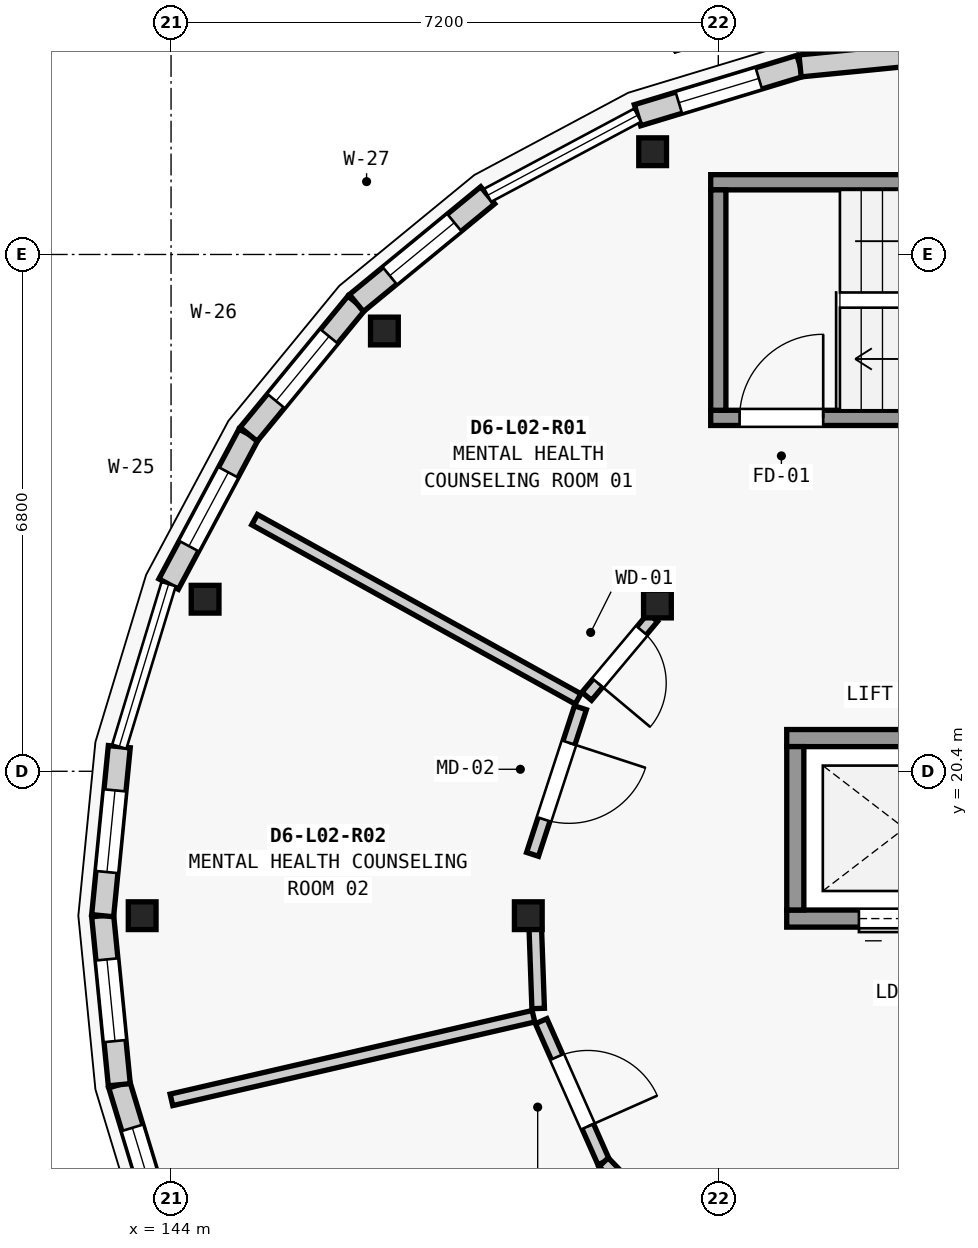
"""IFC4 building model, lengths in metres.
Left out: names, types, materials, properties, quantities, classifications, styles, units other than length and angle.
Written with IfcOpenShell. Run it as: python <this file> out.ifc"""

import sys

from ifc_helpers import new_model, si_unit, direction, frame, frame_2d, origin, origin_2d, place, context, subcontext, project, spatial, rectangle, extrude, element, fill, save


model = new_model("IFC4")
c1 = context("Model", 3, precision=1e-05, world=origin(), true_north=direction((0.0, 1.0)))
c2 = subcontext(c1, "Body", "Model", "MODEL_VIEW")
j1 = project(units=[si_unit("LENGTHUNIT", "METRE"), si_unit("PLANEANGLEUNIT", "RADIAN")], contexts=[c1])
p1 = place(None, origin())
s1 = spatial("IfcSite", under=j1, at=p1, CompositionType="ELEMENT")
p2 = place(p1, origin())
s2 = spatial("IfcBuilding", under=s1, at=p2, CompositionType="ELEMENT")
p3 = place(p2, frame((0.0, 0.0, 8.75)))
s3 = spatial("IfcBuildingStorey", under=s2, at=p3, CompositionType="ELEMENT", Elevation=8.75)
for number, where, z_axis, x_axis in (
    (1, (150.336, 28.552, 0.0), (0.0, 0.0, 1.0), (1.0, 0.0, 0.0)),
    (2, (146.807, 26.193, 0.0), (0.0, 0.0, 1.0), (1.0, 0.0, 0.0)),
    (3, (144.448, 22.664, 0.0), (0.0, 0.0, 1.0), (1.0, 0.0, 0.0)),
    (4, (143.62, 18.5, 0.0), (0.0, 0.0, 1.0), (1.0, 0.0, 0.0)),
    (5, (150.399, 22.601, 0.0), (0.0, 0.0, 1.0), (1.0, 0.0, 0.0)),
    (6, (148.7, 18.5, 0.0), (0.0, 0.0, 1.0), (1.0, 0.0, 0.0)),
):
    element("IfcColumn", number, at=place(p3, frame(where, z_axis=z_axis, x_axis=x_axis)), inside=s3, PredefinedType="COLUMN", context=c2, shape_type="SweptSolid", body=[
        extrude(rectangle(XDim=0.365, YDim=0.365, at=origin_2d()), origin(), (0.0, 0.0, 1.0), 4.2),
    ])
p4 = place(p3, frame((143.968, 14.137, 0.0), z_axis=(0.0, 0.0, 1.0), x_axis=(-0.290322655883, 0.956928814218, 0.0)))
e7 = element("IfcWall", 7, at=p4, inside=s3, PredefinedType="ELEMENTEDWALL", context=c2, shape_type="SweptSolid", body=[
    extrude(rectangle(XDim=2.235, YDim=0.29, at=frame_2d((1.118, 0.0))), origin(), (0.0, 0.0, 1.0), 3.314),
])
p5 = place(p4, frame((0.593, 0.0, 0.85)))
e8 = element("IfcOpeningElement", 8, at=p5, cuts=e7, PredefinedType="OPENING", context=c2, shape_type="SweptSolid", body=[
    extrude(rectangle(XDim=1.05, YDim=2.15, at=frame_2d((0.525, 1.075))), frame((0.0, 0.155, 0.0), z_axis=(0.0, -1.0, 0.0), x_axis=(1.0, 0.0, 0.0)), (0.0, 0.0, 1.0), 0.31),
])
p6 = place(p3, frame((143.319, 16.276, 0.0), z_axis=(0.0, 0.0, 1.0), x_axis=(-0.097989369151, 0.995187461503, 0.0)))
e9 = element("IfcWall", 9, at=p6, inside=s3, PredefinedType="ELEMENTEDWALL", context=c2, shape_type="SweptSolid", body=[
    extrude(rectangle(XDim=2.235, YDim=0.29, at=frame_2d((1.117, 0.0))), origin(), (0.0, 0.0, 1.0), 3.314),
])
p7 = place(p6, frame((0.577, 0.0, 0.85)))
e10 = element("IfcOpeningElement", 10, at=p7, cuts=e9, PredefinedType="OPENING", context=c2, shape_type="SweptSolid", body=[
    extrude(rectangle(XDim=1.08, YDim=1.5, at=frame_2d((0.54, 0.75))), frame((0.0, 0.155, 0.0), z_axis=(0.0, -1.0, 0.0), x_axis=(1.0, 0.0, 0.0)), (0.0, 0.0, 1.0), 0.31),
])
p8 = place(p3, frame((143.1, 18.5, 0.0), z_axis=(0.0, 0.0, 1.0), x_axis=(0.097989369151, 0.995187461503, 0.0)))
e11 = element("IfcWall", 11, at=p8, inside=s3, PredefinedType="ELEMENTEDWALL", context=c2, shape_type="SweptSolid", body=[
    extrude(rectangle(XDim=2.235, YDim=0.29, at=frame_2d((1.117, 0.0))), origin(), (0.0, 0.0, 1.0), 3.314),
])
p9 = place(p8, frame((0.577, 0.0, 0.85)))
e12 = element("IfcOpeningElement", 12, at=p9, cuts=e11, PredefinedType="OPENING", context=c2, shape_type="SweptSolid", body=[
    extrude(rectangle(XDim=1.08, YDim=1.8, at=frame_2d((0.54, 0.9))), frame((0.0, 0.155, 0.0), z_axis=(0.0, -1.0, 0.0), x_axis=(1.0, 0.0, 0.0)), (0.0, 0.0, 1.0), 0.31),
])
p10 = place(p3, frame((143.968, 22.863, 0.0), z_axis=(0.0, 0.0, 1.0), x_axis=(0.471217561446, 0.882017012185, 0.0)))
e13 = element("IfcWall", 13, at=p10, inside=s3, PredefinedType="ELEMENTEDWALL", context=c2, shape_type="SweptSolid", body=[
    extrude(rectangle(XDim=2.235, YDim=0.29, at=frame_2d((1.117, 0.0))), origin(), (0.0, 0.0, 1.0), 3.314),
])
p11 = place(p10, frame((0.567, 0.0, 0.85)))
e14 = element("IfcOpeningElement", 14, at=p11, cuts=e13, PredefinedType="OPENING", context=c2, shape_type="SweptSolid", body=[
    extrude(rectangle(XDim=1.1, YDim=1.25, at=frame_2d((0.55, 0.625))), frame((0.0, 0.155, 0.0), z_axis=(0.0, -1.0, 0.0), x_axis=(1.0, 0.0, 0.0)), (0.0, 0.0, 1.0), 0.31),
])
p12 = place(p3, frame((145.021, 24.834, 0.0), z_axis=(0.0, 0.0, 1.0), x_axis=(0.63455767339, 0.772875513354, 0.0)))
e15 = element("IfcWall", 15, at=p12, inside=s3, PredefinedType="ELEMENTEDWALL", context=c2, shape_type="SweptSolid", body=[
    extrude(rectangle(XDim=2.235, YDim=0.29, at=frame_2d((1.117, 0.0))), origin(), (0.0, 0.0, 1.0), 3.314),
])
p13 = place(p12, frame((0.567, 0.0, 0.85)))
e16 = element("IfcOpeningElement", 16, at=p13, cuts=e15, PredefinedType="OPENING", context=c2, shape_type="SweptSolid", body=[
    extrude(rectangle(XDim=1.1, YDim=1.5, at=frame_2d((0.55, 0.75))), frame((0.0, 0.155, 0.0), z_axis=(0.0, -1.0, 0.0), x_axis=(1.0, 0.0, 0.0)), (0.0, 0.0, 1.0), 0.31),
])
p14 = place(p3, frame((146.439, 26.561, 0.0), z_axis=(0.0, 0.0, 1.0), x_axis=(0.772875513354, 0.63455767339, 0.0)))
e17 = element("IfcWall", 17, at=p14, inside=s3, PredefinedType="ELEMENTEDWALL", context=c2, shape_type="SweptSolid", body=[
    extrude(rectangle(XDim=2.235, YDim=0.29, at=frame_2d((1.117, 0.0))), origin(), (0.0, 0.0, 1.0), 3.314),
])
p15 = place(p14, frame((0.567, 0.0, 0.85)))
e18 = element("IfcOpeningElement", 18, at=p15, cuts=e17, PredefinedType="OPENING", context=c2, shape_type="SweptSolid", body=[
    extrude(rectangle(XDim=1.1, YDim=1.85, at=frame_2d((0.55, 0.925))), frame((0.0, 0.155, 0.0), z_axis=(0.0, -1.0, 0.0), x_axis=(1.0, 0.0, 0.0)), (0.0, 0.0, 1.0), 0.31),
])
p16 = place(p3, frame((150.137, 29.032, 0.0), z_axis=(0.0, 0.0, 1.0), x_axis=(0.956928814218, 0.290322655883, 0.0)))
e19 = element("IfcWall", 19, at=p16, inside=s3, PredefinedType="ELEMENTEDWALL", context=c2, shape_type="SweptSolid", body=[
    extrude(rectangle(XDim=2.235, YDim=0.29, at=frame_2d((1.118, 0.0))), origin(), (0.0, 0.0, 1.0), 3.314),
])
p17 = place(p16, frame((0.568, 0.0, 0.85)))
e20 = element("IfcOpeningElement", 20, at=p17, cuts=e19, PredefinedType="OPENING", context=c2, shape_type="SweptSolid", body=[
    extrude(rectangle(XDim=1.1, YDim=2.1, at=frame_2d((0.55, 1.05))), frame((0.0, 0.155, 0.0), z_axis=(0.0, -1.0, 0.0), x_axis=(1.0, 0.0, 0.0)), (0.0, 0.0, 1.0), 0.31),
])
p18 = place(p3, frame((152.276, 29.681, 0.0), z_axis=(0.0, 0.0, 1.0), x_axis=(0.995187461503, 0.097989369151, 0.0)))
e21 = element("IfcWall", 21, at=p18, inside=s3, PredefinedType="ELEMENTEDWALL", context=c2, shape_type="SweptSolid", body=[
    extrude(rectangle(XDim=2.235, YDim=0.29, at=frame_2d((1.117, 0.0))), origin(), (0.0, 0.0, 1.0), 3.314),
])
p19 = place(p3, frame((151.1, 25.05, 0.0), z_axis=(0.0, 0.0, 1.0), x_axis=(1.0, 0.0, 0.0)))
e22 = element("IfcWall", 22, at=p19, inside=s3, PredefinedType="SHEAR", context=c2, shape_type="SweptSolid", body=[
    extrude(rectangle(XDim=6.8, YDim=0.2, at=frame_2d((3.4, 0.0))), origin(), (0.0, 0.0, 1.0), 3.96),
])
p20 = place(p19, frame((0.38, 0.0, 0.0)))
e23 = element("IfcOpeningElement", 23, at=p20, cuts=e22, PredefinedType="OPENING", context=c2, shape_type="SweptSolid", body=[
    extrude(rectangle(XDim=1.1, YDim=2.15, at=frame_2d((0.55, 1.075))), frame((0.0, 0.11, 0.0), z_axis=(0.0, -1.0, 0.0), x_axis=(1.0, 0.0, 0.0)), (0.0, 0.0, 1.0), 0.22),
])
p21 = place(p3, frame((151.1, 28.15, 0.0), z_axis=(0.0, 0.0, 1.0), x_axis=(1.0, 0.0, 0.0)))
e24 = element("IfcWall", 24, at=p21, inside=s3, PredefinedType="SHEAR", context=c2, shape_type="SweptSolid", body=[
    extrude(rectangle(XDim=6.8, YDim=0.2, at=frame_2d((3.4, 0.0))), origin(), (0.0, 0.0, 1.0), 3.96),
])
p22 = place(p3, frame((151.2, 25.15, 0.0), z_axis=(0.0, 0.0, 1.0), x_axis=(0.0, 1.0, 0.0)))
e25 = element("IfcWall", 25, at=p22, inside=s3, PredefinedType="SHEAR", context=c2, shape_type="SweptSolid", body=[
    extrude(rectangle(XDim=2.9, YDim=0.2, at=frame_2d((1.45, 0.0))), origin(), (0.0, 0.0, 1.0), 3.96),
])
p23 = place(p3, frame((152.1, 18.462, 0.0), z_axis=(0.0, 0.0, 1.0), x_axis=(1.0, 0.0, 0.0)))
e26 = element("IfcWall", 26, at=p23, inside=s3, PredefinedType="SHEAR", context=c2, shape_type="SweptSolid", body=[
    extrude(rectangle(XDim=3.1, YDim=0.225, at=frame_2d((1.55, 0.0))), origin(), (0.0, 0.0, 1.0), 3.96),
])
p24 = place(p23, frame((0.95, 0.0, 0.0)))
e27 = element("IfcOpeningElement", 27, at=p24, cuts=e26, PredefinedType="OPENING", context=c2, shape_type="SweptSolid", body=[
    extrude(rectangle(XDim=1.2, YDim=2.2, at=frame_2d((0.6, 1.1))), frame((0.0, 0.123, 0.0), z_axis=(0.0, -1.0, 0.0), x_axis=(1.0, 0.0, 0.0)), (0.0, 0.0, 1.0), 0.245),
])
p25 = place(p3, frame((152.1, 20.837, 0.0), z_axis=(0.0, 0.0, 1.0), x_axis=(1.0, 0.0, 0.0)))
e28 = element("IfcWall", 28, at=p25, inside=s3, PredefinedType="SHEAR", context=c2, shape_type="SweptSolid", body=[
    extrude(rectangle(XDim=3.1, YDim=0.225, at=frame_2d((1.55, 0.0))), origin(), (0.0, 0.0, 1.0), 3.96),
])
p26 = place(p3, frame((152.213, 18.575, 0.0), z_axis=(0.0, 0.0, 1.0), x_axis=(0.0, 1.0, 0.0)))
e29 = element("IfcWall", 29, at=p26, inside=s3, PredefinedType="SHEAR", context=c2, shape_type="SweptSolid", body=[
    extrude(rectangle(XDim=2.15, YDim=0.225, at=frame_2d((1.075, 0.0))), origin(), (0.0, 0.0, 1.0), 3.96),
])
p27 = place(p3, frame((149.355, 21.352, 0.0), z_axis=(0.0, 0.0, 1.0), x_axis=(-0.874634926541, 0.484782162703, 0.0)))
e30 = element("IfcWall", 30, at=p27, inside=s3, PredefinedType="PARTITIONING", context=c2, shape_type="SweptSolid", body=[
    extrude(rectangle(XDim=4.866, YDim=0.155, at=frame_2d((2.433, 0.0))), origin(), (0.0, 0.0, 1.0), 3.279),
])
p28 = place(p3, frame((148.768, 17.177, 0.0), z_axis=(0.0, 0.0, 1.0), x_axis=(-0.974350778181, -0.225034577472, 0.0)))
e31 = element("IfcWall", 31, at=p28, inside=s3, PredefinedType="PARTITIONING", context=c2, shape_type="SweptSolid", body=[
    extrude(rectangle(XDim=4.889, YDim=0.155, at=frame_2d((2.444, 0.0))), origin(), (0.0, 0.0, 1.0), 3.279),
])
p29 = place(p3, frame((150.338, 22.424, 0.0), z_axis=(0.0, 0.0, 1.0), x_axis=(-0.64220553528, -0.766532484931, 0.0)))
e32 = element("IfcWall", 32, at=p29, inside=s3, PredefinedType="PARTITIONING", context=c2, shape_type="SweptSolid", body=[
    extrude(rectangle(XDim=1.353, YDim=0.165, at=frame_2d((0.677, 0.0))), origin(), (0.0, 0.0, 1.0), 3.279),
])
p30 = place(p29, frame((0.226, 0.0, 0.0)))
e33 = element("IfcOpeningElement", 33, at=p30, cuts=e32, PredefinedType="OPENING", context=c2, shape_type="SweptSolid", body=[
    extrude(rectangle(XDim=0.9, YDim=2.1, at=frame_2d((0.45, 1.05))), frame((0.0, 0.093, 0.0), z_axis=(0.0, -1.0, 0.0), x_axis=(1.0, 0.0, 0.0)), (0.0, 0.0, 1.0), 0.185),
])
p31 = place(p3, frame((149.386, 21.236, 0.0), z_axis=(0.0, 0.0, 1.0), x_axis=(-0.310375158833, -0.950614149263, 0.0)))
e34 = element("IfcWall", 34, at=p31, inside=s3, PredefinedType="PARTITIONING", context=c2, shape_type="SweptSolid", body=[
    extrude(rectangle(XDim=2.03, YDim=0.165, at=frame_2d((1.015, 0.0))), origin(), (0.0, 0.0, 1.0), 3.279),
])
p32 = place(p31, frame((0.485, 0.0, 0.0)))
e35 = element("IfcOpeningElement", 35, at=p32, cuts=e34, PredefinedType="OPENING", context=c2, shape_type="SweptSolid", body=[
    extrude(rectangle(XDim=1.06, YDim=2.2, at=frame_2d((0.53, 1.1))), frame((0.0, 0.093, 0.0), z_axis=(0.0, -1.0, 0.0), x_axis=(1.0, 0.0, 0.0)), (0.0, 0.0, 1.0), 0.185),
])
p33 = place(p3, frame((148.792, 18.337, 0.0), z_axis=(0.0, 0.0, 1.0), x_axis=(0.035979458719, -0.999352529666, 0.0)))
e36 = element("IfcWall", 36, at=p33, inside=s3, PredefinedType="PARTITIONING", context=c2, shape_type="SweptSolid", body=[
    extrude(rectangle(XDim=1.059, YDim=0.165, at=frame_2d((0.529, 0.0))), origin(), (0.0, 0.0, 1.0), 3.279),
])
p34 = place(p3, frame((148.869, 17.112, 0.0), z_axis=(0.0, 0.0, 1.0), x_axis=(0.40554678001, -0.914074290867, 0.0)))
e37 = element("IfcWall", 37, at=p34, inside=s3, PredefinedType="PARTITIONING", context=c2, shape_type="SweptSolid", body=[
    extrude(rectangle(XDim=2.029, YDim=0.165, at=frame_2d((1.015, 0.0))), origin(), (0.0, 0.0, 1.0), 3.279),
])
p35 = place(p34, frame((0.515, 0.0, 0.0)))
e38 = element("IfcOpeningElement", 38, at=p35, cuts=e37, PredefinedType="OPENING", context=c2, shape_type="SweptSolid", body=[
    extrude(rectangle(XDim=1.0, YDim=2.18, at=frame_2d((0.5, 1.09))), frame((0.0, 0.093, 0.0), z_axis=(0.0, -1.0, 0.0), x_axis=(1.0, 0.0, 0.0)), (0.0, 0.0, 1.0), 0.185),
])
p36 = place(p3, frame((149.692, 15.257, 0.0), z_axis=(0.0, 0.0, 1.0), x_axis=(0.695365384634, -0.718656372582, 0.0)))
e39 = element("IfcWall", 39, at=p36, inside=s3, PredefinedType="PARTITIONING", context=c2, shape_type="SweptSolid", body=[
    extrude(rectangle(XDim=0.943, YDim=0.165, at=frame_2d((0.472, 0.0))), origin(), (0.0, 0.0, 1.0), 3.279),
])
p37 = place(p5, origin())
e40 = element("IfcWindow", 40, at=p37, inside=s3, PartitioningType="SINGLE_PANEL", PredefinedType="WINDOW", context=c2, shape_type="SweptSolid", body=[
    extrude(rectangle(XDim=1.05, YDim=2.15, at=frame_2d((0.525, 1.075))), frame((0.0, 0.03, 0.0), z_axis=(0.0, -1.0, 0.0), x_axis=(1.0, 0.0, 0.0)), (0.0, 0.0, 1.0), 0.06),
])
fill(e8, e40)
p38 = place(p7, origin())
e41 = element("IfcWindow", 41, at=p38, inside=s3, PartitioningType="SINGLE_PANEL", PredefinedType="WINDOW", context=c2, shape_type="SweptSolid", body=[
    extrude(rectangle(XDim=1.08, YDim=1.5, at=frame_2d((0.54, 0.75))), frame((0.0, 0.03, 0.0), z_axis=(0.0, -1.0, 0.0), x_axis=(1.0, 0.0, 0.0)), (0.0, 0.0, 1.0), 0.06),
])
fill(e10, e41)
p39 = place(p9, origin())
e42 = element("IfcWindow", 42, at=p39, inside=s3, PartitioningType="SINGLE_PANEL", PredefinedType="WINDOW", context=c2, shape_type="SweptSolid", body=[
    extrude(rectangle(XDim=1.08, YDim=1.8, at=frame_2d((0.54, 0.9))), frame((0.0, 0.03, 0.0), z_axis=(0.0, -1.0, 0.0), x_axis=(1.0, 0.0, 0.0)), (0.0, 0.0, 1.0), 0.06),
])
fill(e12, e42)
p40 = place(p11, origin())
e43 = element("IfcWindow", 43, at=p40, inside=s3, PartitioningType="SINGLE_PANEL", PredefinedType="WINDOW", context=c2, shape_type="SweptSolid", body=[
    extrude(rectangle(XDim=1.1, YDim=1.25, at=frame_2d((0.55, 0.625))), frame((0.0, 0.03, 0.0), z_axis=(0.0, -1.0, 0.0), x_axis=(1.0, 0.0, 0.0)), (0.0, 0.0, 1.0), 0.06),
])
fill(e14, e43)
p41 = place(p13, origin())
e44 = element("IfcWindow", 44, at=p41, inside=s3, PartitioningType="SINGLE_PANEL", PredefinedType="WINDOW", context=c2, shape_type="SweptSolid", body=[
    extrude(rectangle(XDim=1.1, YDim=1.5, at=frame_2d((0.55, 0.75))), frame((0.0, 0.03, 0.0), z_axis=(0.0, -1.0, 0.0), x_axis=(1.0, 0.0, 0.0)), (0.0, 0.0, 1.0), 0.06),
])
fill(e16, e44)
p42 = place(p15, origin())
e45 = element("IfcWindow", 45, at=p42, inside=s3, PartitioningType="SINGLE_PANEL", PredefinedType="WINDOW", context=c2, shape_type="SweptSolid", body=[
    extrude(rectangle(XDim=1.1, YDim=1.85, at=frame_2d((0.55, 0.925))), frame((0.0, 0.03, 0.0), z_axis=(0.0, -1.0, 0.0), x_axis=(1.0, 0.0, 0.0)), (0.0, 0.0, 1.0), 0.06),
])
fill(e18, e45)
p43 = place(p17, origin())
e46 = element("IfcWindow", 46, at=p43, inside=s3, PartitioningType="SINGLE_PANEL", PredefinedType="WINDOW", context=c2, shape_type="SweptSolid", body=[
    extrude(rectangle(XDim=1.1, YDim=2.1, at=frame_2d((0.55, 1.05))), frame((0.0, 0.03, 0.0), z_axis=(0.0, -1.0, 0.0), x_axis=(1.0, 0.0, 0.0)), (0.0, 0.0, 1.0), 0.06),
])
fill(e20, e46)
p44 = place(p20, origin())
e47 = element("IfcDoor", 47, at=p44, inside=s3, OperationType="SINGLE_SWING_RIGHT", PredefinedType="DOOR", context=c2, shape_type="SweptSolid", body=[
    extrude(rectangle(XDim=1.1, YDim=2.15, at=frame_2d((0.55, 1.075))), frame((0.0, 0.025, 0.0), z_axis=(0.0, -1.0, 0.0), x_axis=(1.0, 0.0, 0.0)), (0.0, 0.0, 1.0), 0.05),
])
fill(e23, e47)
p45 = place(p24, origin())
e48 = element("IfcDoor", 48, at=p45, inside=s3, OperationType="DOUBLE_DOOR_SLIDING", PredefinedType="DOOR", context=c2, shape_type="SweptSolid", body=[
    extrude(rectangle(XDim=1.2, YDim=2.2, at=frame_2d((0.6, 1.1))), frame((0.0, 0.025, 0.0), z_axis=(0.0, -1.0, 0.0), x_axis=(1.0, 0.0, 0.0)), (0.0, 0.0, 1.0), 0.05),
])
fill(e27, e48)
p46 = place(p30, origin())
e49 = element("IfcDoor", 49, at=p46, inside=s3, OperationType="SINGLE_SWING_RIGHT", PredefinedType="DOOR", context=c2, shape_type="SweptSolid", body=[
    extrude(rectangle(XDim=0.9, YDim=2.1, at=frame_2d((0.45, 1.05))), frame((0.0, 0.025, 0.0), z_axis=(0.0, -1.0, 0.0), x_axis=(1.0, 0.0, 0.0)), (0.0, 0.0, 1.0), 0.05),
])
fill(e33, e49)
p47 = place(p32, origin())
e50 = element("IfcDoor", 50, at=p47, inside=s3, OperationType="SINGLE_SWING_LEFT", PredefinedType="DOOR", context=c2, shape_type="SweptSolid", body=[
    extrude(rectangle(XDim=1.06, YDim=2.2, at=frame_2d((0.53, 1.1))), frame((0.0, 0.025, 0.0), z_axis=(0.0, -1.0, 0.0), x_axis=(1.0, 0.0, 0.0)), (0.0, 0.0, 1.0), 0.05),
])
fill(e35, e50)
p48 = place(p35, origin())
e51 = element("IfcDoor", 51, at=p48, inside=s3, OperationType="SINGLE_SWING_RIGHT", PredefinedType="DOOR", context=c2, shape_type="SweptSolid", body=[
    extrude(rectangle(XDim=1.0, YDim=2.18, at=frame_2d((0.5, 1.09))), frame((0.0, 0.025, 0.0), z_axis=(0.0, -1.0, 0.0), x_axis=(1.0, 0.0, 0.0)), (0.0, 0.0, 1.0), 0.05),
])
fill(e38, e51)
save(model, sys.argv[1])
